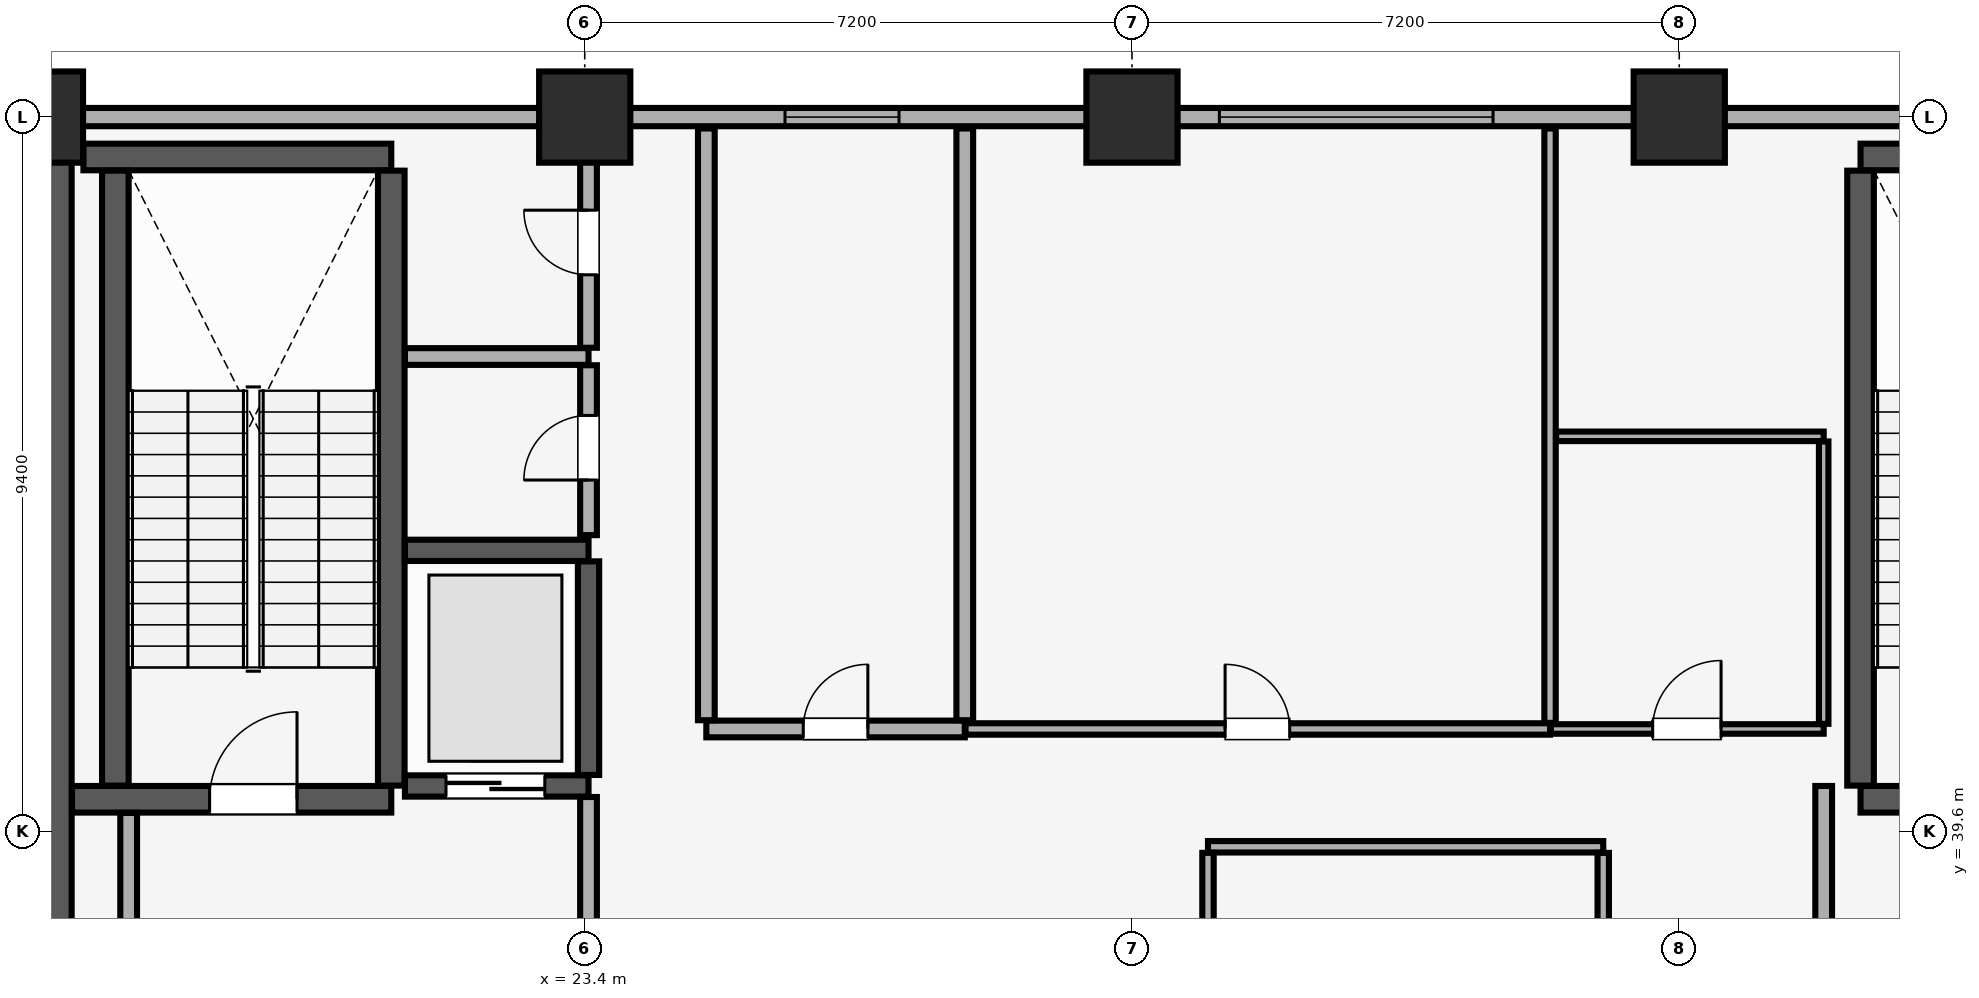
"""IFC4 building model, lengths in metres.
Left out: names, types, materials, properties, quantities, classifications, styles, units other than length and angle.
Written with IfcOpenShell. Run it as: python <this file> out.ifc"""

import sys

from ifc_helpers import new_model, si_unit, direction, frame, frame_2d, origin, origin_2d, place, context, subcontext, project, spatial, rectangle, extrude, element, fill, save


model = new_model("IFC4")
c1 = context("Model", 3, precision=1e-05, world=origin(), true_north=direction((0.0, 1.0)))
c2 = subcontext(c1, "Body", "Model", "MODEL_VIEW")
j1 = project(units=[si_unit("LENGTHUNIT", "METRE"), si_unit("PLANEANGLEUNIT", "RADIAN")], contexts=[c1])
p1 = place(None, origin())
s1 = spatial("IfcSite", under=j1, at=p1, CompositionType="ELEMENT")
p2 = place(p1, origin())
s2 = spatial("IfcBuilding", under=s1, at=p2, CompositionType="ELEMENT")
p3 = place(p2, frame((0.0, 0.0, 224.35)))
s3 = spatial("IfcBuildingStorey", under=s2, at=p3, CompositionType="ELEMENT", Elevation=224.35)
for number, where, z_axis, x_axis in (
    (1, (16.2, 49.0, 0.0), (0.0, 0.0, 1.0), (1.0, 0.0, 0.0)),
    (2, (23.4, 49.0, 0.0), (0.0, 0.0, 1.0), (1.0, 0.0, 0.0)),
    (3, (30.6, 49.0, 0.0), (0.0, 0.0, 1.0), (1.0, 0.0, 0.0)),
    (4, (37.8, 49.0, 0.0), (0.0, 0.0, 1.0), (1.0, 0.0, 0.0)),
):
    element("IfcColumn", number, at=place(p3, frame(where, z_axis=z_axis, x_axis=x_axis)), inside=s3, PredefinedType="COLUMN", context=c2, shape_type="SweptSolid", body=[
        extrude(rectangle(XDim=1.2, YDim=1.2, at=origin_2d()), origin(), (0.0, 0.0, 1.0), 4.56),
    ])
p4 = place(p3, frame((77.0, 49.0, 0.0), z_axis=(0.0, 0.0, 1.0), x_axis=(-1.0, 0.0, 0.0)))
e5 = element("IfcWall", 5, at=p4, inside=s3, PredefinedType="SOLIDWALL", context=c2, shape_type="SweptSolid", body=[
    extrude(rectangle(XDim=70.0, YDim=0.24, at=frame_2d((35.0, 0.0))), origin(), (0.0, 0.0, 1.0), 3.4),
])
p5 = place(p4, frame((62.975, 0.0, 0.85)))
e6 = element("IfcOpeningElement", 6, at=p5, cuts=e5, PredefinedType="OPENING", context=c2, shape_type="SweptSolid", body=[
    extrude(rectangle(XDim=3.0, YDim=1.5, at=frame_2d((1.5, 0.75))), frame((0.0, 0.13, 0.0), z_axis=(0.0, -1.0, 0.0), x_axis=(1.0, 0.0, 0.0)), (0.0, 0.0, 1.0), 0.26),
])
p6 = place(p4, frame((4.025, 0.0, 0.85)))
e7 = element("IfcOpeningElement", 7, at=p6, cuts=e5, PredefinedType="OPENING", context=c2, shape_type="SweptSolid", body=[
    extrude(rectangle(XDim=3.0, YDim=1.5, at=frame_2d((1.5, 0.75))), frame((0.0, 0.13, 0.0), z_axis=(0.0, -1.0, 0.0), x_axis=(1.0, 0.0, 0.0)), (0.0, 0.0, 1.0), 0.26),
])
p7 = place(p4, frame((49.465, 0.0, 0.9)))
e8 = element("IfcOpeningElement", 8, at=p7, cuts=e5, PredefinedType="OPENING", context=c2, shape_type="SweptSolid", body=[
    extrude(rectangle(XDim=1.5, YDim=1.4, at=frame_2d((0.75, 0.7))), frame((0.0, 0.13, 0.0), z_axis=(0.0, -1.0, 0.0), x_axis=(1.0, 0.0, 0.0)), (0.0, 0.0, 1.0), 0.26),
])
p8 = place(p4, frame((41.65, 0.0, 0.9)))
e9 = element("IfcOpeningElement", 9, at=p8, cuts=e5, PredefinedType="OPENING", context=c2, shape_type="SweptSolid", body=[
    extrude(rectangle(XDim=3.6, YDim=1.5, at=frame_2d((1.8, 0.75))), frame((0.0, 0.13, 0.0), z_axis=(0.0, -1.0, 0.0), x_axis=(1.0, 0.0, 0.0)), (0.0, 0.0, 1.0), 0.26),
])
p9 = place(p4, frame((28.25, 0.0, 0.9)))
e10 = element("IfcOpeningElement", 10, at=p9, cuts=e5, PredefinedType="OPENING", context=c2, shape_type="SweptSolid", body=[
    extrude(rectangle(XDim=1.5, YDim=1.4, at=frame_2d((0.75, 0.7))), frame((0.0, 0.13, 0.0), z_axis=(0.0, -1.0, 0.0), x_axis=(1.0, 0.0, 0.0)), (0.0, 0.0, 1.0), 0.26),
])
p10 = place(p4, frame((24.6, 0.0, 0.9)))
e11 = element("IfcOpeningElement", 11, at=p10, cuts=e5, PredefinedType="OPENING", context=c2, shape_type="SweptSolid", body=[
    extrude(rectangle(XDim=2.4, YDim=1.5, at=frame_2d((1.2, 0.75))), frame((0.0, 0.13, 0.0), z_axis=(0.0, -1.0, 0.0), x_axis=(1.0, 0.0, 0.0)), (0.0, 0.0, 1.0), 0.26),
])
p11 = place(p4, frame((20.235, 0.0, 0.9)))
e12 = element("IfcOpeningElement", 12, at=p11, cuts=e5, PredefinedType="OPENING", context=c2, shape_type="SweptSolid", body=[
    extrude(rectangle(XDim=2.4, YDim=1.5, at=frame_2d((1.2, 0.75))), frame((0.0, 0.13, 0.0), z_axis=(0.0, -1.0, 0.0), x_axis=(1.0, 0.0, 0.0)), (0.0, 0.0, 1.0), 0.26),
])
p12 = place(p3, frame((16.2, 29.4, 0.0), z_axis=(0.0, 0.0, 1.0), x_axis=(0.0, 1.0, 0.0)))
e13 = element("IfcWall", 13, at=p12, inside=s3, PredefinedType="SHEAR", context=c2, shape_type="SweptSolid", body=[
    extrude(rectangle(XDim=19.2, YDim=0.9, at=frame_2d((9.6, 0.0))), origin(), (0.0, 0.0, 1.0), 4.52),
])
p13 = place(p3, frame((16.655, 40.025, 0.0), z_axis=(0.0, 0.0, 1.0), x_axis=(1.0, 0.0, 0.0)))
e14 = element("IfcWall", 14, at=p13, inside=s3, PredefinedType="SHEAR", context=c2, shape_type="SweptSolid", body=[
    extrude(rectangle(XDim=4.2, YDim=0.35, at=frame_2d((2.1, 0.0))), origin(), (0.0, 0.0, 1.0), 4.52),
])
p14 = place(p13, frame((1.81, 0.0, 0.0)))
e15 = element("IfcOpeningElement", 15, at=p14, cuts=e14, PredefinedType="OPENING", context=c2, shape_type="SweptSolid", body=[
    extrude(rectangle(XDim=1.15, YDim=2.15, at=frame_2d((0.575, 1.075))), frame((0.0, 0.185, 0.0), z_axis=(0.0, -1.0, 0.0), x_axis=(1.0, 0.0, 0.0)), (0.0, 0.0, 1.0), 0.37),
])
p15 = place(p3, frame((16.805, 48.475, 0.0), z_axis=(0.0, 0.0, 1.0), x_axis=(1.0, 0.0, 0.0)))
e16 = element("IfcWall", 16, at=p15, inside=s3, PredefinedType="SHEAR", context=c2, shape_type="SweptSolid", body=[
    extrude(rectangle(XDim=4.05, YDim=0.35, at=frame_2d((2.025, 0.0))), origin(), (0.0, 0.0, 1.0), 4.52),
])
for number, where, z_axis, x_axis in (
    (17, (17.225, 40.205, 0.0), (0.0, 0.0, 1.0), (0.0, 1.0, 0.0)),
    (18, (20.855, 40.205, 0.0), (0.0, 0.0, 1.0), (0.0, 1.0, 0.0)),
):
    element("IfcWall", number, at=place(p3, frame(where, z_axis=z_axis, x_axis=x_axis)), inside=s3, PredefinedType="SHEAR", context=c2, shape_type="SweptSolid", body=[
        extrude(rectangle(XDim=8.09, YDim=0.35, at=frame_2d((4.045, 0.0))), origin(), (0.0, 0.0, 1.0), 4.52),
    ])
p16 = place(p3, frame((40.185, 40.025, 0.0), z_axis=(0.0, 0.0, 1.0), x_axis=(1.0, 0.0, 0.0)))
e19 = element("IfcWall", 19, at=p16, inside=s3, PredefinedType="SHEAR", context=c2, shape_type="SweptSolid", body=[
    extrude(rectangle(XDim=3.63, YDim=0.35, at=frame_2d((1.815, 0.0))), origin(), (0.0, 0.0, 1.0), 4.52),
])
p17 = place(p16, frame((1.24, 0.0, 0.0)))
e20 = element("IfcOpeningElement", 20, at=p17, cuts=e19, PredefinedType="OPENING", context=c2, shape_type="SweptSolid", body=[
    extrude(rectangle(XDim=1.15, YDim=2.15, at=frame_2d((0.575, 1.075))), frame((0.0, 0.185, 0.0), z_axis=(0.0, -1.0, 0.0), x_axis=(1.0, 0.0, 0.0)), (0.0, 0.0, 1.0), 0.37),
])
p18 = place(p3, frame((40.185, 48.475, 0.0), z_axis=(0.0, 0.0, 1.0), x_axis=(1.0, 0.0, 0.0)))
e21 = element("IfcWall", 21, at=p18, inside=s3, PredefinedType="SHEAR", context=c2, shape_type="SweptSolid", body=[
    extrude(rectangle(XDim=3.63, YDim=0.35, at=frame_2d((1.815, 0.0))), origin(), (0.0, 0.0, 1.0), 4.52),
])
p19 = place(p3, frame((40.185, 40.205, 0.0), z_axis=(0.0, 0.0, 1.0), x_axis=(0.0, 1.0, 0.0)))
e22 = element("IfcWall", 22, at=p19, inside=s3, PredefinedType="SHEAR", context=c2, shape_type="SweptSolid", body=[
    extrude(rectangle(XDim=8.09, YDim=0.35, at=frame_2d((4.045, 0.0))), origin(), (0.0, 0.0, 1.0), 4.52),
])
p20 = place(p3, frame((21.035, 40.2, 0.0), z_axis=(0.0, 0.0, 1.0), x_axis=(1.0, 0.0, 0.0)))
e23 = element("IfcWall", 23, at=p20, inside=s3, PredefinedType="SHEAR", context=c2, shape_type="SweptSolid", body=[
    extrude(rectangle(XDim=2.415, YDim=0.28, at=frame_2d((1.208, 0.0))), origin(), (0.0, 0.0, 1.0), 4.52),
])
p21 = place(p20, frame((0.54, 0.0, 0.0)))
e24 = element("IfcOpeningElement", 24, at=p21, cuts=e23, PredefinedType="OPENING", context=c2, shape_type="SweptSolid", body=[
    extrude(rectangle(XDim=1.3, YDim=2.3, at=frame_2d((0.65, 1.15))), frame((0.0, 0.15, 0.0), z_axis=(0.0, -1.0, 0.0), x_axis=(1.0, 0.0, 0.0)), (0.0, 0.0, 1.0), 0.3),
])
p22 = place(p3, frame((21.035, 43.3, 0.0), z_axis=(0.0, 0.0, 1.0), x_axis=(1.0, 0.0, 0.0)))
e25 = element("IfcWall", 25, at=p22, inside=s3, PredefinedType="SHEAR", context=c2, shape_type="SweptSolid", body=[
    extrude(rectangle(XDim=2.415, YDim=0.28, at=frame_2d((1.208, 0.0))), origin(), (0.0, 0.0, 1.0), 4.52),
])
p23 = place(p3, frame((23.45, 40.345, 0.0), z_axis=(0.0, 0.0, 1.0), x_axis=(0.0, 1.0, 0.0)))
e26 = element("IfcWall", 26, at=p23, inside=s3, PredefinedType="SHEAR", context=c2, shape_type="SweptSolid", body=[
    extrude(rectangle(XDim=2.81, YDim=0.28, at=frame_2d((1.405, 0.0))), origin(), (0.0, 0.0, 1.0), 4.52),
])
p24 = place(p3, frame((17.4, 34.415, 0.0), z_axis=(0.0, 0.0, 1.0), x_axis=(0.0, 1.0, 0.0)))
e27 = element("IfcWall", 27, at=p24, inside=s3, PredefinedType="PARTITIONING", context=c2, shape_type="SweptSolid", body=[
    extrude(rectangle(XDim=5.43, YDim=0.22, at=frame_2d((2.715, 0.0))), origin(), (0.0, 0.0, 1.0), 4.52),
])
p25 = place(p3, frame((23.45, 34.415, 0.0), z_axis=(0.0, 0.0, 1.0), x_axis=(0.0, 1.0, 0.0)))
e28 = element("IfcWall", 28, at=p25, inside=s3, PredefinedType="PARTITIONING", context=c2, shape_type="SweptSolid", body=[
    extrude(rectangle(XDim=5.64, YDim=0.22, at=frame_2d((2.82, 0.0))), origin(), (0.0, 0.0, 1.0), 4.52),
])
p26 = place(p3, frame((39.7, 34.415, 0.0), z_axis=(0.0, 0.0, 1.0), x_axis=(0.0, 1.0, 0.0)))
e29 = element("IfcWall", 29, at=p26, inside=s3, PredefinedType="PARTITIONING", context=c2, shape_type="SweptSolid", body=[
    extrude(rectangle(XDim=5.785, YDim=0.22, at=frame_2d((2.893, 0.0))), origin(), (0.0, 0.0, 1.0), 4.52),
])
p27 = place(p3, frame((21.035, 45.85, 0.0), z_axis=(0.0, 0.0, 1.0), x_axis=(1.0, 0.0, 0.0)))
e30 = element("IfcWall", 30, at=p27, inside=s3, PredefinedType="PARTITIONING", context=c2, shape_type="SweptSolid", body=[
    extrude(rectangle(XDim=2.415, YDim=0.22, at=frame_2d((1.208, 0.0))), origin(), (0.0, 0.0, 1.0), 4.52),
])
p28 = place(p3, frame((23.45, 43.5, 0.0), z_axis=(0.0, 0.0, 1.0), x_axis=(0.0, 1.0, 0.0)))
e31 = element("IfcWall", 31, at=p28, inside=s3, PredefinedType="PARTITIONING", context=c2, shape_type="SweptSolid", body=[
    extrude(rectangle(XDim=2.235, YDim=0.22, at=frame_2d((1.118, 0.0))), origin(), (0.0, 0.0, 1.0), 4.52),
])
p29 = place(p28, frame((0.725, 0.0, 0.0)))
e32 = element("IfcOpeningElement", 32, at=p29, cuts=e31, PredefinedType="OPENING", context=c2, shape_type="SweptSolid", body=[
    extrude(rectangle(XDim=0.85, YDim=2.1, at=frame_2d((0.425, 1.05))), frame((0.0, 0.12, 0.0), z_axis=(0.0, -1.0, 0.0), x_axis=(1.0, 0.0, 0.0)), (0.0, 0.0, 1.0), 0.24),
])
p30 = place(p3, frame((23.45, 45.965, 0.0), z_axis=(0.0, 0.0, 1.0), x_axis=(0.0, 1.0, 0.0)))
e33 = element("IfcWall", 33, at=p30, inside=s3, PredefinedType="PARTITIONING", context=c2, shape_type="SweptSolid", body=[
    extrude(rectangle(XDim=2.885, YDim=0.22, at=frame_2d((1.442, 0.0))), origin(), (0.0, 0.0, 1.0), 4.52),
])
p31 = place(p30, frame((0.96, 0.0, 0.0)))
e34 = element("IfcOpeningElement", 34, at=p31, cuts=e33, PredefinedType="OPENING", context=c2, shape_type="SweptSolid", body=[
    extrude(rectangle(XDim=0.85, YDim=2.1, at=frame_2d((0.425, 1.05))), frame((0.0, 0.12, 0.0), z_axis=(0.0, -1.0, 0.0), x_axis=(1.0, 0.0, 0.0)), (0.0, 0.0, 1.0), 0.24),
])
p32 = place(p3, frame((31.6, 39.4, 0.0), z_axis=(0.0, 0.0, 1.0), x_axis=(1.0, 0.0, 0.0)))
e35 = element("IfcWall", 35, at=p32, inside=s3, PredefinedType="PARTITIONING", context=c2, shape_type="SweptSolid", body=[
    extrude(rectangle(XDim=5.2, YDim=0.15, at=frame_2d((2.6, 0.0))), origin(), (0.0, 0.0, 1.0), 4.52),
])
for number, where, z_axis, x_axis in (
    (36, (31.6, 34.38, 0.0), (0.0, 0.0, 1.0), (0.0, 1.0, 0.0)),
    (37, (36.8, 34.38, 0.0), (0.0, 0.0, 1.0), (0.0, 1.0, 0.0)),
):
    element("IfcWall", number, at=place(p3, frame(where, z_axis=z_axis, x_axis=x_axis)), inside=s3, PredefinedType="PARTITIONING", context=c2, shape_type="SweptSolid", body=[
        extrude(rectangle(XDim=4.94, YDim=0.15, at=frame_2d((2.47, 0.0))), origin(), (0.0, 0.0, 1.0), 4.52),
    ])
p33 = place(p3, frame((25.0, 40.95, 0.0), z_axis=(0.0, 0.0, 1.0), x_axis=(1.0, 0.0, 0.0)))
e38 = element("IfcWall", 38, at=p33, inside=s3, PredefinedType="PARTITIONING", context=c2, shape_type="SweptSolid", body=[
    extrude(rectangle(XDim=3.4, YDim=0.22, at=frame_2d((1.7, 0.0))), origin(), (0.0, 0.0, 1.0), 4.52),
])
p34 = place(p33, frame((1.275, 0.0, 0.0)))
e39 = element("IfcOpeningElement", 39, at=p34, cuts=e38, PredefinedType="OPENING", context=c2, shape_type="SweptSolid", body=[
    extrude(rectangle(XDim=0.85, YDim=2.1, at=frame_2d((0.425, 1.05))), frame((0.0, 0.12, 0.0), z_axis=(0.0, -1.0, 0.0), x_axis=(1.0, 0.0, 0.0)), (0.0, 0.0, 1.0), 0.24),
])
for number, where, z_axis, x_axis in (
    (40, (25.0, 41.065, 0.0), (0.0, 0.0, 1.0), (0.0, 1.0, 0.0)),
    (41, (28.4, 41.065, 0.0), (0.0, 0.0, 1.0), (0.0, 1.0, 0.0)),
):
    element("IfcWall", number, at=place(p3, frame(where, z_axis=z_axis, x_axis=x_axis)), inside=s3, PredefinedType="PARTITIONING", context=c2, shape_type="SweptSolid", body=[
        extrude(rectangle(XDim=7.785, YDim=0.22, at=frame_2d((3.893, 0.0))), origin(), (0.0, 0.0, 1.0), 4.52),
    ])
p35 = place(p3, frame((28.41, 40.95, 0.0), z_axis=(0.0, 0.0, 1.0), x_axis=(1.0, 0.0, 0.0)))
e42 = element("IfcWall", 42, at=p35, inside=s3, PredefinedType="PARTITIONING", context=c2, shape_type="SweptSolid", body=[
    extrude(rectangle(XDim=7.69, YDim=0.15, at=frame_2d((3.845, 0.0))), origin(), (0.0, 0.0, 1.0), 4.52),
])
p36 = place(p35, frame((3.415, 0.0, 0.0)))
e43 = element("IfcOpeningElement", 43, at=p36, cuts=e42, PredefinedType="OPENING", context=c2, shape_type="SweptSolid", body=[
    extrude(rectangle(XDim=0.85, YDim=2.1, at=frame_2d((0.425, 1.05))), frame((0.0, 0.085, 0.0), z_axis=(0.0, -1.0, 0.0), x_axis=(1.0, 0.0, 0.0)), (0.0, 0.0, 1.0), 0.17),
])
p37 = place(p3, frame((36.1, 41.03, 0.0), z_axis=(0.0, 0.0, 1.0), x_axis=(0.0, 1.0, 0.0)))
e44 = element("IfcWall", 44, at=p37, inside=s3, PredefinedType="PARTITIONING", context=c2, shape_type="SweptSolid", body=[
    extrude(rectangle(XDim=7.82, YDim=0.15, at=frame_2d((3.91, 0.0))), origin(), (0.0, 0.0, 1.0), 4.52),
])
p38 = place(p3, frame((36.11, 40.95, 0.0), z_axis=(0.0, 0.0, 1.0), x_axis=(1.0, 0.0, 0.0)))
e45 = element("IfcWall", 45, at=p38, inside=s3, PredefinedType="PARTITIONING", context=c2, shape_type="SweptSolid", body=[
    extrude(rectangle(XDim=3.59, YDim=0.125, at=frame_2d((1.795, 0.0))), origin(), (0.0, 0.0, 1.0), 4.52),
])
p39 = place(p38, frame((1.34, 0.0, 0.0)))
e46 = element("IfcOpeningElement", 46, at=p39, cuts=e45, PredefinedType="OPENING", context=c2, shape_type="SweptSolid", body=[
    extrude(rectangle(XDim=0.9, YDim=2.1, at=frame_2d((0.45, 1.05))), frame((0.0, 0.073, 0.0), z_axis=(0.0, -1.0, 0.0), x_axis=(1.0, 0.0, 0.0)), (0.0, 0.0, 1.0), 0.145),
])
p40 = place(p3, frame((36.18, 44.8, 0.0), z_axis=(0.0, 0.0, 1.0), x_axis=(1.0, 0.0, 0.0)))
e47 = element("IfcWall", 47, at=p40, inside=s3, PredefinedType="PARTITIONING", context=c2, shape_type="SweptSolid", body=[
    extrude(rectangle(XDim=3.52, YDim=0.125, at=frame_2d((1.76, 0.0))), origin(), (0.0, 0.0, 1.0), 4.52),
])
p41 = place(p3, frame((39.7, 41.018, 0.0), z_axis=(0.0, 0.0, 1.0), x_axis=(0.0, 1.0, 0.0)))
e48 = element("IfcWall", 48, at=p41, inside=s3, PredefinedType="PARTITIONING", context=c2, shape_type="SweptSolid", body=[
    extrude(rectangle(XDim=3.715, YDim=0.125, at=frame_2d((1.857, 0.0))), origin(), (0.0, 0.0, 1.0), 4.52),
])
p42 = place(p7, origin())
e49 = element("IfcWindow", 49, at=p42, inside=s3, PartitioningType="SINGLE_PANEL", PredefinedType="WINDOW", context=c2, shape_type="SweptSolid", body=[
    extrude(rectangle(XDim=1.5, YDim=1.4, at=frame_2d((0.75, 0.7))), frame((0.0, 0.03, 0.0), z_axis=(0.0, -1.0, 0.0), x_axis=(1.0, 0.0, 0.0)), (0.0, 0.0, 1.0), 0.06),
])
fill(e8, e49)
p43 = place(p8, origin())
e50 = element("IfcWindow", 50, at=p43, inside=s3, PartitioningType="SINGLE_PANEL", PredefinedType="WINDOW", context=c2, shape_type="SweptSolid", body=[
    extrude(rectangle(XDim=3.6, YDim=1.5, at=frame_2d((1.8, 0.75))), frame((0.0, 0.03, 0.0), z_axis=(0.0, -1.0, 0.0), x_axis=(1.0, 0.0, 0.0)), (0.0, 0.0, 1.0), 0.06),
])
fill(e9, e50)
p44 = place(p14, origin())
e51 = element("IfcDoor", 51, at=p44, inside=s3, OperationType="SINGLE_SWING_RIGHT", PredefinedType="DOOR", context=c2, shape_type="SweptSolid", body=[
    extrude(rectangle(XDim=1.15, YDim=2.15, at=frame_2d((0.575, 1.075))), frame((0.0, 0.025, 0.0), z_axis=(0.0, -1.0, 0.0), x_axis=(1.0, 0.0, 0.0)), (0.0, 0.0, 1.0), 0.05),
])
fill(e15, e51)
p45 = place(p21, origin())
e52 = element("IfcDoor", 52, at=p45, inside=s3, OperationType="DOUBLE_DOOR_SLIDING", PredefinedType="DOOR", context=c2, shape_type="SweptSolid", body=[
    extrude(rectangle(XDim=1.3, YDim=2.3, at=frame_2d((0.65, 1.15))), frame((0.0, 0.025, 0.0), z_axis=(0.0, -1.0, 0.0), x_axis=(1.0, 0.0, 0.0)), (0.0, 0.0, 1.0), 0.05),
])
fill(e24, e52)
p46 = place(p29, origin())
e53 = element("IfcDoor", 53, at=p46, inside=s3, OperationType="SINGLE_SWING_LEFT", PredefinedType="DOOR", context=c2, shape_type="SweptSolid", body=[
    extrude(rectangle(XDim=0.85, YDim=2.1, at=frame_2d((0.425, 1.05))), frame((0.0, 0.025, 0.0), z_axis=(0.0, -1.0, 0.0), x_axis=(1.0, 0.0, 0.0)), (0.0, 0.0, 1.0), 0.05),
])
fill(e32, e53)
p47 = place(p31, origin())
e54 = element("IfcDoor", 54, at=p47, inside=s3, OperationType="SINGLE_SWING_RIGHT", PredefinedType="DOOR", context=c2, shape_type="SweptSolid", body=[
    extrude(rectangle(XDim=0.85, YDim=2.1, at=frame_2d((0.425, 1.05))), frame((0.0, 0.025, 0.0), z_axis=(0.0, -1.0, 0.0), x_axis=(1.0, 0.0, 0.0)), (0.0, 0.0, 1.0), 0.05),
])
fill(e34, e54)
p48 = place(p34, origin())
e55 = element("IfcDoor", 55, at=p48, inside=s3, OperationType="SINGLE_SWING_RIGHT", PredefinedType="DOOR", context=c2, shape_type="SweptSolid", body=[
    extrude(rectangle(XDim=0.85, YDim=2.1, at=frame_2d((0.425, 1.05))), frame((0.0, 0.025, 0.0), z_axis=(0.0, -1.0, 0.0), x_axis=(1.0, 0.0, 0.0)), (0.0, 0.0, 1.0), 0.05),
])
fill(e39, e55)
p49 = place(p36, origin())
e56 = element("IfcDoor", 56, at=p49, inside=s3, OperationType="SINGLE_SWING_LEFT", PredefinedType="DOOR", context=c2, shape_type="SweptSolid", body=[
    extrude(rectangle(XDim=0.85, YDim=2.1, at=frame_2d((0.425, 1.05))), frame((0.0, 0.025, 0.0), z_axis=(0.0, -1.0, 0.0), x_axis=(1.0, 0.0, 0.0)), (0.0, 0.0, 1.0), 0.05),
])
fill(e43, e56)
p50 = place(p39, origin())
e57 = element("IfcDoor", 57, at=p50, inside=s3, OperationType="SINGLE_SWING_RIGHT", PredefinedType="DOOR", context=c2, shape_type="SweptSolid", body=[
    extrude(rectangle(XDim=0.9, YDim=2.1, at=frame_2d((0.45, 1.05))), frame((0.0, 0.025, 0.0), z_axis=(0.0, -1.0, 0.0), x_axis=(1.0, 0.0, 0.0)), (0.0, 0.0, 1.0), 0.05),
])
fill(e46, e57)
save(model, sys.argv[1])
